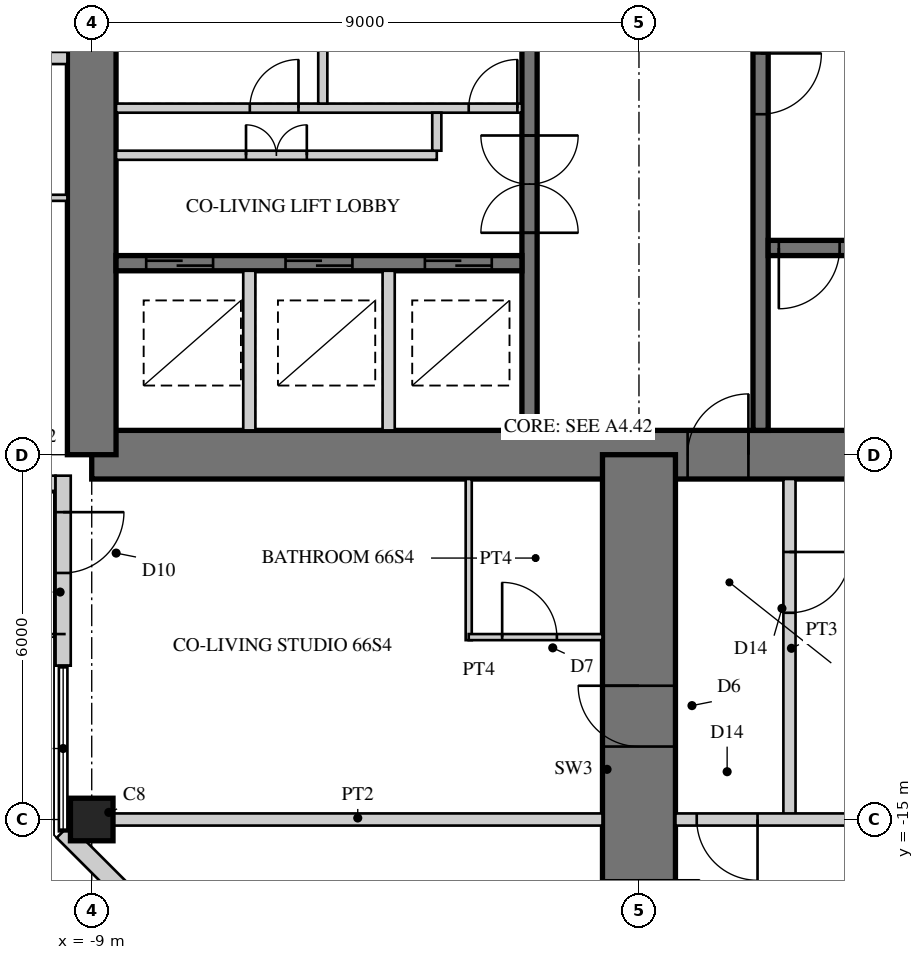
"""IFC4 building model, lengths in metres.
Left out: names, types, materials, properties, quantities, classifications, styles, units other than length and angle.
Written with IfcOpenShell. Run it as: python <this file> out.ifc"""

import sys

from ifc_helpers import new_model, si_unit, direction, frame, frame_2d, origin, origin_2d, place, context, subcontext, project, spatial, rectangle, hollow_rectangle, extrude, element, fill, save


model = new_model("IFC4")
c1 = context("Model", 3, precision=1e-05, world=origin(), true_north=direction((0.0, 1.0)))
c2 = subcontext(c1, "Body", "Model", "MODEL_VIEW")
j1 = project(units=[si_unit("LENGTHUNIT", "METRE"), si_unit("PLANEANGLEUNIT", "RADIAN")], contexts=[c1])
p1 = place(None, origin())
s1 = spatial("IfcSite", under=j1, at=p1, CompositionType="ELEMENT")
p2 = place(p1, origin())
s2 = spatial("IfcBuilding", under=s1, at=p2, CompositionType="ELEMENT")
p3 = place(p2, frame((0.0, 0.0, 257.7)))
s3 = spatial("IfcBuildingStorey", under=s2, at=p3, CompositionType="ELEMENT", Elevation=257.7)
p4 = place(p3, frame((-9.0, -9.0, 0.0), z_axis=(0.0, 0.0, 1.0), x_axis=(1.0, 0.0, 0.0)))
e1 = element("IfcWall", 1, at=p4, inside=s3, PredefinedType="SHEAR", context=c2, shape_type="SweptSolid", body=[
    extrude(rectangle(XDim=18.0, YDim=0.8, at=frame_2d((9.0, 0.0))), origin(), (0.0, 0.0, 1.0), 3.4),
])
p5 = place(p4, frame((9.8, 0.0, 0.0)))
e2 = element("IfcOpeningElement", 2, at=p5, cuts=e1, PredefinedType="OPENING", context=c2, shape_type="SweptSolid", body=[
    extrude(rectangle(XDim=1.0, YDim=2.4, at=frame_2d((0.5, 1.2))), frame((0.0, 0.41, 0.0), z_axis=(0.0, -1.0, 0.0), x_axis=(1.0, 0.0, 0.0)), (0.0, 0.0, 1.0), 0.82),
])
p6 = place(p3, frame((-9.0, 9.0, 0.0), z_axis=(0.0, 0.0, 1.0), x_axis=(0.0, -1.0, 0.0)))
e3 = element("IfcWall", 3, at=p6, inside=s3, PredefinedType="SHEAR", context=c2, shape_type="SweptSolid", body=[
    extrude(rectangle(XDim=18.0, YDim=0.8, at=frame_2d((9.0, 0.0))), origin(), (0.0, 0.0, 1.0), 3.4),
])
p7 = place(p6, frame((9.8, 0.0, 0.0)))
e4 = element("IfcOpeningElement", 4, at=p7, cuts=e3, PredefinedType="OPENING", context=c2, shape_type="SweptSolid", body=[
    extrude(rectangle(XDim=1.0, YDim=2.4, at=frame_2d((0.5, 1.2))), frame((0.0, 0.41, 0.0), z_axis=(0.0, -1.0, 0.0), x_axis=(1.0, 0.0, 0.0)), (0.0, 0.0, 1.0), 0.82),
])
p8 = place(p3, frame((-1.8, -1.875, 0.0), z_axis=(0.0, 0.0, 1.0), x_axis=(0.0, -1.0, 0.0)))
e5 = element("IfcWall", 5, at=p8, inside=s3, PredefinedType="SHEAR", context=c2, shape_type="SweptSolid", body=[
    extrude(rectangle(XDim=6.725, YDim=0.25, at=frame_2d((3.363, 0.0))), origin(), (0.0, 0.0, 1.0), 3.4),
])
p9 = place(p8, frame((1.875, 0.0, 0.0)))
e6 = element("IfcOpeningElement", 6, at=p9, cuts=e5, PredefinedType="OPENING", context=c2, shape_type="SweptSolid", body=[
    extrude(rectangle(XDim=1.6, YDim=2.4, at=frame_2d((0.8, 1.2))), frame((0.0, 0.135, 0.0), z_axis=(0.0, -1.0, 0.0), x_axis=(1.0, 0.0, 0.0)), (0.0, 0.0, 1.0), 0.27),
])
p10 = place(p3, frame((-1.925, -5.85, 0.0), z_axis=(0.0, 0.0, 1.0), x_axis=(-1.0, 0.0, 0.0)))
e7 = element("IfcWall", 7, at=p10, inside=s3, PredefinedType="SHEAR", context=c2, shape_type="SweptSolid", body=[
    extrude(rectangle(XDim=6.675, YDim=0.25, at=frame_2d((3.337, 0.0))), origin(), (0.0, 0.0, 1.0), 3.4),
])
p11 = place(p10, frame((0.496, 0.0, 0.0)))
e8 = element("IfcOpeningElement", 8, at=p11, cuts=e7, PredefinedType="OPENING", context=c2, shape_type="SweptSolid", body=[
    extrude(rectangle(XDim=1.1, YDim=2.2, at=frame_2d((0.55, 1.1))), frame((0.0, 0.135, 0.0), z_axis=(0.0, -1.0, 0.0), x_axis=(1.0, 0.0, 0.0)), (0.0, 0.0, 1.0), 0.27),
])
p12 = place(p10, frame((2.788, 0.0, 0.0)))
e9 = element("IfcOpeningElement", 9, at=p12, cuts=e7, PredefinedType="OPENING", context=c2, shape_type="SweptSolid", body=[
    extrude(rectangle(XDim=1.1, YDim=2.2, at=frame_2d((0.55, 1.1))), frame((0.0, 0.135, 0.0), z_axis=(0.0, -1.0, 0.0), x_axis=(1.0, 0.0, 0.0)), (0.0, 0.0, 1.0), 0.27),
])
p13 = place(p10, frame((5.079, 0.0, 0.0)))
e10 = element("IfcOpeningElement", 10, at=p13, cuts=e7, PredefinedType="OPENING", context=c2, shape_type="SweptSolid", body=[
    extrude(rectangle(XDim=1.1, YDim=2.2, at=frame_2d((0.55, 1.1))), frame((0.0, 0.135, 0.0), z_axis=(0.0, -1.0, 0.0), x_axis=(1.0, 0.0, 0.0)), (0.0, 0.0, 1.0), 0.27),
])
p14 = place(p3, frame((-1.925, -3.3, 0.0), z_axis=(0.0, 0.0, 1.0), x_axis=(-1.0, 0.0, 0.0)))
e11 = element("IfcWall", 11, at=p14, inside=s3, PredefinedType="PARTITIONING", context=c2, shape_type="SweptSolid", body=[
    extrude(rectangle(XDim=6.675, YDim=0.15, at=frame_2d((3.337, 0.0))), origin(), (0.0, 0.0, 1.0), 3.4),
])
p15 = place(p14, frame((0.075, 0.0, 0.0)))
e12 = element("IfcOpeningElement", 12, at=p15, cuts=e11, PredefinedType="OPENING", context=c2, shape_type="SweptSolid", body=[
    extrude(rectangle(XDim=0.8, YDim=2.1, at=frame_2d((0.4, 1.05))), frame((0.0, 0.085, 0.0), z_axis=(0.0, -1.0, 0.0), x_axis=(1.0, 0.0, 0.0)), (0.0, 0.0, 1.0), 0.17),
])
p16 = place(p14, frame((3.675, 0.0, 0.0)))
e13 = element("IfcOpeningElement", 13, at=p16, cuts=e11, PredefinedType="OPENING", context=c2, shape_type="SweptSolid", body=[
    extrude(rectangle(XDim=0.8, YDim=2.1, at=frame_2d((0.4, 1.05))), frame((0.0, 0.085, 0.0), z_axis=(0.0, -1.0, 0.0), x_axis=(1.0, 0.0, 0.0)), (0.0, 0.0, 1.0), 0.17),
])
p17 = place(p3, frame((-5.2, -2.125, 0.0), z_axis=(0.0, 0.0, 1.0), x_axis=(0.0, -1.0, 0.0)))
e14 = element("IfcWall", 14, at=p17, inside=s3, PredefinedType="PARTITIONING", context=c2, shape_type="SweptSolid", body=[
    extrude(rectangle(XDim=1.1, YDim=0.15, at=frame_2d((0.55, 0.0))), origin(), (0.0, 0.0, 1.0), 3.4),
])
for number, where, z_axis, x_axis in (
    (15, (-4.117, -5.975, 0.0), (0.0, 0.0, 1.0), (0.0, -1.0, 0.0)),
    (16, (-6.408, -5.975, 0.0), (0.0, 0.0, 1.0), (0.0, -1.0, 0.0)),
):
    element("IfcWall", number, at=place(p3, frame(where, z_axis=z_axis, x_axis=x_axis)), inside=s3, PredefinedType="PARTITIONING", context=c2, shape_type="SweptSolid", body=[
        extrude(rectangle(XDim=2.625, YDim=0.2, at=frame_2d((1.312, 0.0))), origin(), (0.0, 0.0, 1.0), 3.4),
    ])
p18 = place(p3, frame((2.0, -1.675, 0.0), z_axis=(0.0, 0.0, 1.0), x_axis=(0.0, -1.0, 0.0)))
e17 = element("IfcWall", 17, at=p18, inside=s3, PredefinedType="SHEAR", context=c2, shape_type="SweptSolid", body=[
    extrude(rectangle(XDim=6.925, YDim=0.25, at=frame_2d((3.462, 0.0))), origin(), (0.0, 0.0, 1.0), 3.4),
])
p19 = place(p18, frame((0.725, 0.0, 0.0)))
e18 = element("IfcOpeningElement", 18, at=p19, cuts=e17, PredefinedType="OPENING", context=c2, shape_type="SweptSolid", body=[
    extrude(rectangle(XDim=1.0, YDim=2.1, at=frame_2d((0.5, 1.05))), frame((0.0, 0.135, 0.0), z_axis=(0.0, -1.0, 0.0), x_axis=(1.0, 0.0, 0.0)), (0.0, 0.0, 1.0), 0.27),
])
p20 = place(p3, frame((2.125, -5.6, 0.0), z_axis=(0.0, 0.0, 1.0), x_axis=(1.0, 0.0, 0.0)))
e19 = element("IfcWall", 19, at=p20, inside=s3, PredefinedType="SHEAR", context=c2, shape_type="SweptSolid", body=[
    extrude(rectangle(XDim=6.475, YDim=0.25, at=frame_2d((3.238, 0.0))), origin(), (0.0, 0.0, 1.0), 3.4),
])
p21 = place(p20, frame((0.175, 0.0, 0.0)))
e20 = element("IfcOpeningElement", 20, at=p21, cuts=e19, PredefinedType="OPENING", context=c2, shape_type="SweptSolid", body=[
    extrude(rectangle(XDim=1.0, YDim=2.1, at=frame_2d((0.5, 1.05))), frame((0.0, 0.135, 0.0), z_axis=(0.0, -1.0, 0.0), x_axis=(1.0, 0.0, 0.0)), (0.0, 0.0, 1.0), 0.27),
])
p22 = place(p3, frame((0.0, -9.0, 0.0), z_axis=(0.0, 0.0, 1.0), x_axis=(0.0, -1.0, 0.0)))
e21 = element("IfcWall", 21, at=p22, inside=s3, PredefinedType="SHEAR", context=c2, shape_type="SweptSolid", body=[
    extrude(rectangle(XDim=9.0, YDim=1.2, at=frame_2d((4.5, 0.0))), origin(), (0.0, 0.0, 1.0), 3.4),
])
p23 = place(p22, frame((3.8, 0.0, 0.0)))
e22 = element("IfcOpeningElement", 22, at=p23, cuts=e21, PredefinedType="OPENING", context=c2, shape_type="SweptSolid", body=[
    extrude(rectangle(XDim=1.0, YDim=2.15, at=frame_2d((0.5, 1.075))), frame((0.0, 0.61, 0.0), z_axis=(0.0, -1.0, 0.0), x_axis=(1.0, 0.0, 0.0)), (0.0, 0.0, 1.0), 1.22),
])
p24 = place(p22, frame((7.0, 0.0, 0.0)))
e23 = element("IfcOpeningElement", 23, at=p24, cuts=e21, PredefinedType="OPENING", context=c2, shape_type="SweptSolid", body=[
    extrude(rectangle(XDim=1.0, YDim=2.2, at=frame_2d((0.5, 1.1))), frame((0.0, 0.61, 0.0), z_axis=(0.0, -1.0, 0.0), x_axis=(1.0, 0.0, 0.0)), (0.0, 0.0, 1.0), 1.22),
])
p25 = place(p3, frame((-9.0, -15.0, 0.0), z_axis=(0.0, 0.0, 1.0), x_axis=(1.0, 0.0, 0.0)))
e24 = element("IfcColumn", 24, at=p25, inside=s3, PredefinedType="COLUMN", context=c2, shape_type="SweptSolid", body=[
    extrude(rectangle(XDim=0.7, YDim=0.7, at=origin_2d()), origin(), (0.0, 0.0, 1.0), 3.4),
])
p26 = place(p3, frame((-12.47, -9.47, 0.0), z_axis=(0.0, 0.0, 1.0), x_axis=(1.0, 0.0, 0.0)))
e25 = element("IfcWall", 25, at=p26, inside=s3, PredefinedType="SOLIDWALL", context=c2, shape_type="SweptSolid", body=[
    extrude(rectangle(XDim=2.875, YDim=0.25, at=frame_2d((1.438, 0.0))), origin(), (0.0, 0.0, 1.0), 3.22),
])
p27 = place(p26, frame((0.6, 0.0, 0.0)))
e26 = element("IfcOpeningElement", 26, at=p27, cuts=e25, PredefinedType="OPENING", context=c2, shape_type="SweptSolid", body=[
    extrude(rectangle(XDim=1.0, YDim=2.2, at=frame_2d((0.5, 1.1))), frame((0.0, 0.135, 0.0), z_axis=(0.0, -1.0, 0.0), x_axis=(1.0, 0.0, 0.0)), (0.0, 0.0, 1.0), 0.27),
])
p28 = place(p3, frame((-9.47, -9.345, 0.0), z_axis=(0.0, 0.0, 1.0), x_axis=(0.0, -1.0, 0.0)))
e27 = element("IfcWall", 27, at=p28, inside=s3, PredefinedType="SOLIDWALL", context=c2, shape_type="SweptSolid", body=[
    extrude(rectangle(XDim=3.125, YDim=0.25, at=frame_2d((1.562, 0.0))), origin(), (0.0, 0.0, 1.0), 3.22),
])
p29 = place(p28, frame((0.6, 0.0, 0.0)))
e28 = element("IfcOpeningElement", 28, at=p29, cuts=e27, PredefinedType="OPENING", context=c2, shape_type="SweptSolid", body=[
    extrude(rectangle(XDim=1.0, YDim=2.2, at=frame_2d((0.5, 1.1))), frame((0.0, 0.135, 0.0), z_axis=(0.0, -1.0, 0.0), x_axis=(1.0, 0.0, 0.0)), (0.0, 0.0, 1.0), 0.27),
])
p30 = place(p3, frame((-9.47, -15.195, 0.0), z_axis=(0.0, 0.0, 1.0), x_axis=(0.707106781187, -0.707106781187, 0.0)))
e29 = element("IfcWall", 29, at=p30, inside=s3, PredefinedType="SOLIDWALL", context=c2, shape_type="SweptSolid", body=[
    extrude(rectangle(XDim=4.632, YDim=0.3, at=frame_2d((2.316, 0.0))), origin(), (0.0, 0.0, 1.0), 3.22),
])
p31 = place(p30, frame((1.866, 0.0, 0.3)))
e30 = element("IfcOpeningElement", 30, at=p31, cuts=e29, PredefinedType="OPENING", context=c2, shape_type="SweptSolid", body=[
    extrude(rectangle(XDim=0.9, YDim=2.4, at=frame_2d((0.45, 1.2))), frame((0.0, 0.16, 0.0), z_axis=(0.0, -1.0, 0.0), x_axis=(1.0, 0.0, 0.0)), (0.0, 0.0, 1.0), 0.32),
])
p32 = place(p3, frame((-3.325, -4.075, 0.0), z_axis=(0.0, 0.0, 1.0), x_axis=(-1.0, 0.0, 0.0)))
e31 = element("IfcWall", 31, at=p32, inside=s3, PredefinedType="PARTITIONING", context=c2, shape_type="SweptSolid", body=[
    extrude(rectangle(XDim=5.275, YDim=0.15, at=frame_2d((2.638, 0.0))), origin(), (0.0, 0.0, 1.0), 3.22),
])
p33 = place(p32, frame((2.137, 0.0, 0.0)))
e32 = element("IfcOpeningElement", 32, at=p33, cuts=e31, PredefinedType="OPENING", context=c2, shape_type="SweptSolid", body=[
    extrude(rectangle(XDim=1.0, YDim=2.1, at=frame_2d((0.5, 1.05))), frame((0.0, 0.085, 0.0), z_axis=(0.0, -1.0, 0.0), x_axis=(1.0, 0.0, 0.0)), (0.0, 0.0, 1.0), 0.17),
])
p34 = place(p3, frame((-3.325, -3.375, 0.0), z_axis=(0.0, 0.0, 1.0), x_axis=(0.0, -1.0, 0.0)))
e33 = element("IfcWall", 33, at=p34, inside=s3, PredefinedType="PARTITIONING", context=c2, shape_type="SweptSolid", body=[
    extrude(rectangle(XDim=0.625, YDim=0.15, at=frame_2d((0.312, 0.0))), origin(), (0.0, 0.0, 1.0), 3.22),
])
p35 = place(p3, frame((-2.8, -9.4, 0.0), z_axis=(0.0, 0.0, 1.0), x_axis=(0.0, -1.0, 0.0)))
e34 = element("IfcWall", 34, at=p35, inside=s3, PredefinedType="PARTITIONING", context=c2, shape_type="SweptSolid", body=[
    extrude(rectangle(XDim=2.65, YDim=0.1, at=frame_2d((1.325, 0.0))), origin(), (0.0, 0.0, 1.0), 3.22),
])
p36 = place(p3, frame((-2.8, -12.0, 0.0), z_axis=(0.0, 0.0, 1.0), x_axis=(1.0, 0.0, 0.0)))
e35 = element("IfcWall", 35, at=p36, inside=s3, PredefinedType="PARTITIONING", context=c2, shape_type="SweptSolid", body=[
    extrude(rectangle(XDim=2.2, YDim=0.1, at=frame_2d((1.1, 0.0))), origin(), (0.0, 0.0, 1.0), 3.22),
])
p37 = place(p36, frame((0.55, 0.0, 0.0)))
e36 = element("IfcOpeningElement", 36, at=p37, cuts=e35, PredefinedType="OPENING", context=c2, shape_type="SweptSolid", body=[
    extrude(rectangle(XDim=0.9, YDim=2.1, at=frame_2d((0.45, 1.05))), frame((0.0, 0.06, 0.0), z_axis=(0.0, -1.0, 0.0), x_axis=(1.0, 0.0, 0.0)), (0.0, 0.0, 1.0), 0.12),
])
p38 = place(p3, frame((2.475, -9.4, 0.0), z_axis=(0.0, 0.0, 1.0), x_axis=(0.0, -1.0, 0.0)))
e37 = element("IfcWall", 37, at=p38, inside=s3, PredefinedType="SOLIDWALL", context=c2, shape_type="SweptSolid", body=[
    extrude(rectangle(XDim=5.6, YDim=0.2, at=frame_2d((2.8, 0.0))), origin(), (0.0, 0.0, 1.0), 3.22),
])
p39 = place(p38, frame((1.2, 0.0, 0.0)))
e38 = element("IfcOpeningElement", 38, at=p39, cuts=e37, PredefinedType="OPENING", context=c2, shape_type="SweptSolid", body=[
    extrude(rectangle(XDim=1.0, YDim=2.2, at=frame_2d((0.5, 1.1))), frame((0.0, 0.11, 0.0), z_axis=(0.0, -1.0, 0.0), x_axis=(1.0, 0.0, 0.0)), (0.0, 0.0, 1.0), 0.22),
])
p40 = place(p3, frame((-8.65, -15.0, 0.0), z_axis=(0.0, 0.0, 1.0), x_axis=(1.0, 0.0, 0.0)))
e39 = element("IfcWall", 39, at=p40, inside=s3, PredefinedType="SOLIDWALL", context=c2, shape_type="SweptSolid", body=[
    extrude(rectangle(XDim=8.05, YDim=0.2, at=frame_2d((4.025, 0.0))), origin(), (0.0, 0.0, 1.0), 2.52),
])
p41 = place(p3, frame((0.6, -15.0, 0.0), z_axis=(0.0, 0.0, 1.0), x_axis=(1.0, 0.0, 0.0)))
e40 = element("IfcWall", 40, at=p41, inside=s3, PredefinedType="SOLIDWALL", context=c2, shape_type="SweptSolid", body=[
    extrude(rectangle(XDim=8.05, YDim=0.2, at=frame_2d((4.025, 0.0))), origin(), (0.0, 0.0, 1.0), 2.52),
])
p42 = place(p41, frame((0.35, 0.0, 0.0)))
e41 = element("IfcOpeningElement", 41, at=p42, cuts=e40, PredefinedType="OPENING", context=c2, shape_type="SweptSolid", body=[
    extrude(rectangle(XDim=1.0, YDim=2.2, at=frame_2d((0.5, 1.1))), frame((0.0, 0.11, 0.0), z_axis=(0.0, -1.0, 0.0), x_axis=(1.0, 0.0, 0.0)), (0.0, 0.0, 1.0), 0.22),
])
p43 = place(p3, frame((-9.4, -4.775, 0.0), z_axis=(0.0, 0.0, 1.0), x_axis=(-1.0, 0.0, 0.0)))
e42 = element("IfcWall", 42, at=p43, inside=s3, PredefinedType="PARTITIONING", context=c2, shape_type="SweptSolid", body=[
    extrude(rectangle(XDim=2.65, YDim=0.1, at=frame_2d((1.325, 0.0))), origin(), (0.0, 0.0, 1.0), 3.22),
])
p44 = place(p3, frame((-9.4, -2.475, 0.0), z_axis=(0.0, 0.0, 1.0), x_axis=(-1.0, 0.0, 0.0)))
e43 = element("IfcWall", 43, at=p44, inside=s3, PredefinedType="SOLIDWALL", context=c2, shape_type="SweptSolid", body=[
    extrude(rectangle(XDim=5.6, YDim=0.2, at=frame_2d((2.8, 0.0))), origin(), (0.0, 0.0, 1.0), 3.22),
])
p45 = place(p44, frame((3.4, 0.0, 0.0)))
e44 = element("IfcOpeningElement", 44, at=p45, cuts=e43, PredefinedType="OPENING", context=c2, shape_type="SweptSolid", body=[
    extrude(rectangle(XDim=1.0, YDim=2.15, at=frame_2d((0.5, 1.075))), frame((0.0, 0.11, 0.0), z_axis=(0.0, -1.0, 0.0), x_axis=(1.0, 0.0, 0.0)), (0.0, 0.0, 1.0), 0.22),
])
p46 = place(p29, origin())
e45 = element("IfcDoor", 45, at=p46, inside=s3, OperationType="SINGLE_SWING_LEFT", PredefinedType="DOOR", context=c2, shape_type="SweptSolid", body=[
    extrude(hollow_rectangle(XDim=1.0, YDim=2.2, WallThickness=0.06, at=frame_2d((0.5, 1.1))), frame((0.0, 0.025, 0.0), z_axis=(0.0, -1.0, 0.0), x_axis=(1.0, 0.0, 0.0)), (0.0, 0.0, 1.0), 0.05),
    extrude(rectangle(XDim=0.879, YDim=2.079, at=frame_2d((0.5, 1.1))), frame((0.0, 0.025, 0.0), z_axis=(0.0, -1.0, 0.0), x_axis=(1.0, 0.0, 0.0)), (0.0, 0.0, 1.0), 0.05),
])
fill(e28, e45)
p47 = place(p33, frame((1.0, 0.0, 0.0), z_axis=(0.0, 0.0, 1.0), x_axis=(-1.0, 0.0, 0.0)))
e46 = element("IfcDoor", 46, at=p47, inside=s3, OperationType="DOUBLE_DOOR_SINGLE_SWING", PredefinedType="DOOR", context=c2, shape_type="SweptSolid", body=[
    extrude(rectangle(XDim=1.0, YDim=2.1, at=frame_2d((0.5, 1.05))), frame((0.0, 0.025, 0.0), z_axis=(0.0, -1.0, 0.0), x_axis=(1.0, 0.0, 0.0)), (0.0, 0.0, 1.0), 0.05),
])
fill(e32, e46)
p48 = place(p37, origin())
e47 = element("IfcDoor", 47, at=p48, inside=s3, OperationType="SINGLE_SWING_LEFT", PredefinedType="DOOR", context=c2, shape_type="SweptSolid", body=[
    extrude(rectangle(XDim=0.9, YDim=2.1, at=frame_2d((0.45, 1.05))), frame((0.0, 0.025, 0.0), z_axis=(0.0, -1.0, 0.0), x_axis=(1.0, 0.0, 0.0)), (0.0, 0.0, 1.0), 0.05),
])
fill(e36, e47)
p49 = place(p39, origin())
e48 = element("IfcDoor", 48, at=p49, inside=s3, OperationType="SINGLE_SWING_LEFT", PredefinedType="DOOR", context=c2, shape_type="SweptSolid", body=[
    extrude(rectangle(XDim=1.0, YDim=2.2, at=frame_2d((0.5, 1.1))), frame((0.0, 0.025, 0.0), z_axis=(0.0, -1.0, 0.0), x_axis=(1.0, 0.0, 0.0)), (0.0, 0.0, 1.0), 0.05),
])
fill(e38, e48)
p50 = place(p42, frame((1.0, 0.0, 0.0), z_axis=(0.0, 0.0, 1.0), x_axis=(-1.0, 0.0, 0.0)))
e49 = element("IfcDoor", 49, at=p50, inside=s3, OperationType="SINGLE_SWING_LEFT", PredefinedType="DOOR", context=c2, shape_type="SweptSolid", body=[
    extrude(rectangle(XDim=1.0, YDim=2.2, at=frame_2d((0.5, 1.1))), frame((0.0, 0.025, 0.0), z_axis=(0.0, -1.0, 0.0), x_axis=(1.0, 0.0, 0.0)), (0.0, 0.0, 1.0), 0.05),
])
fill(e41, e49)
p51 = place(p23, frame((1.0, 0.0, 0.0), z_axis=(0.0, 0.0, 1.0), x_axis=(-1.0, 0.0, 0.0)))
e50 = element("IfcDoor", 50, at=p51, inside=s3, OperationType="SINGLE_SWING_RIGHT", PredefinedType="DOOR", context=c2, shape_type="SweptSolid", body=[
    extrude(rectangle(XDim=1.0, YDim=2.15, at=frame_2d((0.5, 1.075))), frame((0.0, 0.025, 0.0), z_axis=(0.0, -1.0, 0.0), x_axis=(1.0, 0.0, 0.0)), (0.0, 0.0, 1.0), 0.05),
])
fill(e22, e50)
p52 = place(p5, origin())
e51 = element("IfcDoor", 51, at=p52, inside=s3, OperationType="SINGLE_SWING_RIGHT", PredefinedType="DOOR", context=c2, shape_type="SweptSolid", body=[
    extrude(rectangle(XDim=1.0, YDim=2.4, at=frame_2d((0.5, 1.2))), frame((0.0, 0.055, 0.0), z_axis=(0.0, -1.0, 0.0), x_axis=(1.0, 0.0, 0.0)), (0.0, 0.0, 1.0), 0.05),
])
fill(e2, e51)
p53 = place(p11, origin())
e52 = element("IfcDoor", 52, at=p53, inside=s3, OperationType="DOUBLE_DOOR_SLIDING", PredefinedType="DOOR", context=c2, shape_type="SweptSolid", body=[
    extrude(rectangle(XDim=1.1, YDim=2.2, at=frame_2d((0.55, 1.1))), frame((0.0, 0.025, 0.0), z_axis=(0.0, -1.0, 0.0), x_axis=(1.0, 0.0, 0.0)), (0.0, 0.0, 1.0), 0.05),
])
fill(e8, e52)
p54 = place(p12, origin())
e53 = element("IfcDoor", 53, at=p54, inside=s3, OperationType="DOUBLE_DOOR_SLIDING", PredefinedType="DOOR", context=c2, shape_type="SweptSolid", body=[
    extrude(rectangle(XDim=1.1, YDim=2.2, at=frame_2d((0.55, 1.1))), frame((0.0, 0.025, 0.0), z_axis=(0.0, -1.0, 0.0), x_axis=(1.0, 0.0, 0.0)), (0.0, 0.0, 1.0), 0.05),
])
fill(e9, e53)
p55 = place(p13, origin())
e54 = element("IfcDoor", 54, at=p55, inside=s3, OperationType="DOUBLE_DOOR_SLIDING", PredefinedType="DOOR", context=c2, shape_type="SweptSolid", body=[
    extrude(rectangle(XDim=1.1, YDim=2.2, at=frame_2d((0.55, 1.1))), frame((0.0, 0.025, 0.0), z_axis=(0.0, -1.0, 0.0), x_axis=(1.0, 0.0, 0.0)), (0.0, 0.0, 1.0), 0.05),
])
fill(e10, e54)
p56 = place(p9, origin())
e55 = element("IfcDoor", 55, at=p56, inside=s3, OperationType="DOUBLE_DOOR_DOUBLE_SWING", PredefinedType="DOOR", context=c2, shape_type="SweptSolid", body=[
    extrude(rectangle(XDim=1.6, YDim=2.4, at=frame_2d((0.8, 1.2))), frame((0.0, 0.025, 0.0), z_axis=(0.0, -1.0, 0.0), x_axis=(1.0, 0.0, 0.0)), (0.0, 0.0, 1.0), 0.05),
])
fill(e6, e55)
p57 = place(p15, frame((0.8, 0.0, 0.0), z_axis=(0.0, 0.0, 1.0), x_axis=(-1.0, 0.0, 0.0)))
e56 = element("IfcDoor", 56, at=p57, inside=s3, OperationType="SINGLE_SWING_RIGHT", PredefinedType="DOOR", context=c2, shape_type="SweptSolid", body=[
    extrude(rectangle(XDim=0.8, YDim=2.1, at=frame_2d((0.4, 1.05))), frame((0.0, 0.025, 0.0), z_axis=(0.0, -1.0, 0.0), x_axis=(1.0, 0.0, 0.0)), (0.0, 0.0, 1.0), 0.05),
])
fill(e12, e56)
p58 = place(p16, frame((0.8, 0.0, 0.0), z_axis=(0.0, 0.0, 1.0), x_axis=(-1.0, 0.0, 0.0)))
e57 = element("IfcDoor", 57, at=p58, inside=s3, OperationType="SINGLE_SWING_RIGHT", PredefinedType="DOOR", context=c2, shape_type="SweptSolid", body=[
    extrude(rectangle(XDim=0.8, YDim=2.1, at=frame_2d((0.4, 1.05))), frame((0.0, 0.025, 0.0), z_axis=(0.0, -1.0, 0.0), x_axis=(1.0, 0.0, 0.0)), (0.0, 0.0, 1.0), 0.05),
])
fill(e13, e57)
p59 = place(p19, origin())
e58 = element("IfcDoor", 58, at=p59, inside=s3, OperationType="SINGLE_SWING_LEFT", PredefinedType="DOOR", context=c2, shape_type="SweptSolid", body=[
    extrude(rectangle(XDim=1.0, YDim=2.1, at=frame_2d((0.5, 1.05))), frame((0.0, 0.025, 0.0), z_axis=(0.0, -1.0, 0.0), x_axis=(1.0, 0.0, 0.0)), (0.0, 0.0, 1.0), 0.05),
])
fill(e18, e58)
p60 = place(p21, frame((1.0, 0.0, 0.0), z_axis=(0.0, 0.0, 1.0), x_axis=(-1.0, 0.0, 0.0)))
e59 = element("IfcDoor", 59, at=p60, inside=s3, OperationType="SINGLE_SWING_RIGHT", PredefinedType="DOOR", context=c2, shape_type="SweptSolid", body=[
    extrude(rectangle(XDim=1.0, YDim=2.1, at=frame_2d((0.5, 1.05))), frame((0.0, 0.025, 0.0), z_axis=(0.0, -1.0, 0.0), x_axis=(1.0, 0.0, 0.0)), (0.0, 0.0, 1.0), 0.05),
])
fill(e20, e59)
save(model, sys.argv[1])
